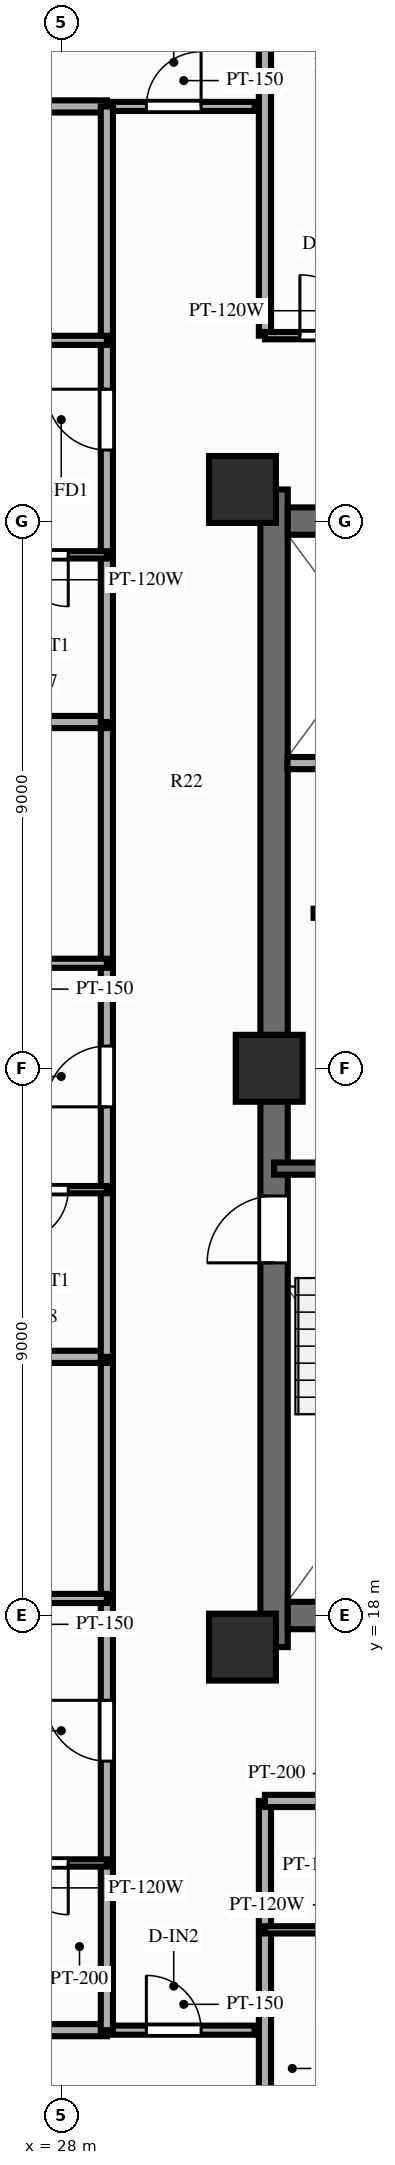
"""IFC4 building model, lengths in metres.
Left out: names, types, materials, properties, quantities, classifications, styles, units other than length and angle.
Written with IfcOpenShell. Run it as: python <this file> out.ifc"""

import sys

from ifc_helpers import new_model, si_unit, direction, frame, frame_2d, origin, origin_2d, place, context, subcontext, project, spatial, rectangle, extrude, source, transform, mapped, element, fill, save


model = new_model("IFC4")
c1 = context("Model", 3, precision=1e-05, world=origin(), true_north=direction((0.0, 1.0)))
c2 = subcontext(c1, "Body", "Model", "MODEL_VIEW")
j1 = project(units=[si_unit("LENGTHUNIT", "METRE"), si_unit("PLANEANGLEUNIT", "RADIAN")], contexts=[c1])
p1 = place(None, origin())
s1 = spatial("IfcSite", under=j1, at=p1, CompositionType="ELEMENT")
p2 = place(p1, origin())
s2 = spatial("IfcBuilding", under=s1, at=p2, CompositionType="ELEMENT")
p3 = place(p2, frame((0.0, 0.0, 176.8)))
s3 = spatial("IfcBuildingStorey", under=s2, at=p3, CompositionType="ELEMENT", Elevation=176.8)
p4 = place(p3, frame((31.5, 17.48, 0.0), z_axis=(0.0, 0.0, 1.0), x_axis=(0.0, 1.0, 0.0)))
e1 = element("IfcWall", 1, at=p4, inside=s3, PredefinedType="SHEAR", context=c2, shape_type="SweptSolid", body=[
    extrude(rectangle(XDim=19.04, YDim=0.45, at=frame_2d((9.52, 0.0))), origin(), (0.0, 0.0, 1.0), 3.0),
])
p5 = place(p4, frame((6.32, 0.0, 0.0)))
e2 = element("IfcOpeningElement", 2, at=p5, cuts=e1, PredefinedType="OPENING", context=c2, shape_type="SweptSolid", body=[
    extrude(rectangle(XDim=1.1, YDim=2.15, at=frame_2d((0.55, 1.075))), frame((0.0, 0.237, 0.0), z_axis=(0.0, -1.0, 0.0), x_axis=(1.0, 0.0, 0.0)), (0.0, 0.0, 1.0), 0.474),
])
p6 = place(p3, frame((31.725, 18.0, 0.0), z_axis=(0.0, 0.0, 1.0), x_axis=(1.0, 0.0, 0.0)))
e3 = element("IfcWall", 3, at=p6, inside=s3, PredefinedType="SHEAR", context=c2, shape_type="SweptSolid", body=[
    extrude(rectangle(XDim=12.55, YDim=0.45, at=frame_2d((6.275, 0.0))), origin(), (0.0, 0.0, 1.0), 3.0),
])
p7 = place(p3, frame((31.725, 36.0, 0.0), z_axis=(0.0, 0.0, 1.0), x_axis=(1.0, 0.0, 0.0)))
e4 = element("IfcWall", 4, at=p7, inside=s3, PredefinedType="SHEAR", context=c2, shape_type="SweptSolid", body=[
    extrude(rectangle(XDim=12.55, YDim=0.45, at=frame_2d((6.275, 0.0))), origin(), (0.0, 0.0, 1.0), 3.0),
])
p8 = place(p7, frame((5.225, 0.0, 0.0), z_axis=(0.0, 0.0, 1.0), x_axis=(-1.0, 0.0, 0.0)))
e5 = element("IfcOpeningElement", 5, at=p8, cuts=e4, PredefinedType="OPENING", context=c2, shape_type="SweptSolid", body=[
    extrude(rectangle(XDim=1.4, YDim=2.15, at=frame_2d((0.7, 1.075))), frame((0.0, 0.237, 0.0), z_axis=(0.0, -1.0, 0.0), x_axis=(1.0, 0.0, 0.0)), (0.0, 0.0, 1.0), 0.474),
])
m1 = source(origin(), c2, "Body", "SweptSolid", [
    extrude(rectangle(XDim=1.1, YDim=1.1, at=origin_2d()), origin(), (0.0, 0.0, 1.0), 3.0),
])
for number, where, z_axis, x_axis in (
    (6, (30.98, 17.48, 0.0), (0.0, 0.0, 1.0), (1.0, 0.0, 0.0)),
    (7, (30.98, 36.52, 0.0), (0.0, 0.0, 1.0), (1.0, 0.0, 0.0)),
    (8, (31.42, 27.0, 0.0), (0.0, 0.0, 1.0), (1.0, 0.0, 0.0)),
):
    element("IfcColumn", number, at=place(p3, frame(where, z_axis=z_axis, x_axis=x_axis)), inside=s3, PredefinedType="COLUMN", context=c2, shape_type="MappedRepresentation", body=[
        mapped(m1, transform((0.0, 0.0, 0.0), scale=1.0)),
    ])
p9 = place(p3, frame((32.15, 29.55, 0.0), z_axis=(0.0, 0.0, 1.0), x_axis=(1.0, 0.0, 0.0)))
e9 = element("IfcWall", 9, at=p9, inside=s3, PredefinedType="PARTITIONING", context=c2, shape_type="SweptSolid", body=[
    extrude(rectangle(XDim=2.27, YDim=0.15, at=frame_2d((1.135, 0.0))), origin(), (0.0, 0.0, 1.0), 2.79),
])
p10 = place(p3, frame((31.5, 25.35, 0.0), z_axis=(0.0, 0.0, 1.0), x_axis=(1.0, 0.0, 0.0)))
e10 = element("IfcWall", 10, at=p10, inside=s3, PredefinedType="SOLIDWALL", context=c2, shape_type="SweptSolid", body=[
    extrude(rectangle(XDim=3.93, YDim=0.2, at=frame_2d((1.965, 0.0))), origin(), (0.0, 0.0, 1.0), 2.79),
])
p11 = place(p3, frame((31.72, 32.02, 0.0), z_axis=(0.0, 0.0, 1.0), x_axis=(1.0, 0.0, 0.0)))
e11 = element("IfcWall", 11, at=p11, inside=s3, PredefinedType="PARTITIONING", context=c2, shape_type="SweptSolid", body=[
    extrude(rectangle(XDim=2.8, YDim=0.2, at=frame_2d((1.4, 0.0))), origin(), (0.0, 0.0, 1.0), 2.79),
])
p12 = place(p3, frame((28.85, 11.18, 0.0), z_axis=(0.0, 0.0, 1.0), x_axis=(1.0, 0.0, 0.0)))
e12 = element("IfcWall", 12, at=p12, inside=s3, PredefinedType="PARTITIONING", context=c2, shape_type="SweptSolid", body=[
    extrude(rectangle(XDim=2.33, YDim=0.15, at=frame_2d((1.165, 0.0))), origin(), (0.0, 0.0, 1.0), 2.79),
])
p13 = place(p12, frame((0.55, 0.0, 0.0)))
e13 = element("IfcOpeningElement", 13, at=p13, cuts=e12, PredefinedType="OPENING", context=c2, shape_type="SweptSolid", body=[
    extrude(rectangle(XDim=0.9, YDim=2.1, at=frame_2d((0.45, 1.05))), frame((0.0, 0.087, 0.0), z_axis=(0.0, -1.0, 0.0), x_axis=(1.0, 0.0, 0.0)), (0.0, 0.0, 1.0), 0.174),
])
p14 = place(p3, frame((28.85, 42.82, 0.0), z_axis=(0.0, 0.0, 1.0), x_axis=(1.0, 0.0, 0.0)))
e14 = element("IfcWall", 14, at=p14, inside=s3, PredefinedType="PARTITIONING", context=c2, shape_type="SweptSolid", body=[
    extrude(rectangle(XDim=2.33, YDim=0.15, at=frame_2d((1.165, 0.0))), origin(), (0.0, 0.0, 1.0), 2.79),
])
p15 = place(p14, frame((0.55, 0.0, 0.0)))
e15 = element("IfcOpeningElement", 15, at=p15, cuts=e14, PredefinedType="OPENING", context=c2, shape_type="SweptSolid", body=[
    extrude(rectangle(XDim=0.9, YDim=2.1, at=frame_2d((0.45, 1.05))), frame((0.0, 0.087, 0.0), z_axis=(0.0, -1.0, 0.0), x_axis=(1.0, 0.0, 0.0)), (0.0, 0.0, 1.0), 0.174),
])
p16 = place(p3, frame((31.35, 14.95, 0.0), z_axis=(0.0, 0.0, 1.0), x_axis=(0.0, -1.0, 0.0)))
e16 = element("IfcWall", 16, at=p16, inside=s3, PredefinedType="PARTITIONING", context=c2, shape_type="SweptSolid", body=[
    extrude(rectangle(XDim=8.8, YDim=0.2, at=frame_2d((4.4, 0.0))), origin(), (0.0, 0.0, 1.0), 2.39),
])
p17 = place(p3, frame((31.35, 14.95, 0.0), z_axis=(0.0, 0.0, 1.0), x_axis=(1.0, 0.0, 0.0)))
e17 = element("IfcWall", 17, at=p17, inside=s3, PredefinedType="PARTITIONING", context=c2, shape_type="SweptSolid", body=[
    extrude(rectangle(XDim=2.2, YDim=0.2, at=frame_2d((1.1, 0.0))), origin(), (0.0, 0.0, 1.0), 2.79),
])
p18 = place(p3, frame((31.35, 12.83, 0.0), z_axis=(0.0, 0.0, 1.0), x_axis=(1.0, 0.0, 0.0)))
e18 = element("IfcWall", 18, at=p18, inside=s3, PredefinedType="PARTITIONING", context=c2, shape_type="SweptSolid", body=[
    extrude(rectangle(XDim=2.2, YDim=0.12, at=frame_2d((1.1, 0.0))), origin(), (0.0, 0.0, 1.0), 2.79),
])
p19 = place(p3, frame((31.35, 39.05, 0.0), z_axis=(0.0, 0.0, 1.0), x_axis=(0.0, 1.0, 0.0)))
e19 = element("IfcWall", 19, at=p19, inside=s3, PredefinedType="PARTITIONING", context=c2, shape_type="SweptSolid", body=[
    extrude(rectangle(XDim=8.8, YDim=0.2, at=frame_2d((4.4, 0.0))), origin(), (0.0, 0.0, 1.0), 2.39),
])
p20 = place(p3, frame((31.35, 39.05, 0.0), z_axis=(0.0, 0.0, 1.0), x_axis=(1.0, 0.0, 0.0)))
e20 = element("IfcWall", 20, at=p20, inside=s3, PredefinedType="PARTITIONING", context=c2, shape_type="SweptSolid", body=[
    extrude(rectangle(XDim=2.15, YDim=0.12, at=frame_2d((1.075, 0.0))), origin(), (0.0, 0.0, 1.0), 2.79),
])
p21 = place(p20, frame((0.575, 0.0, 0.0)))
e21 = element("IfcOpeningElement", 21, at=p21, cuts=e20, PredefinedType="OPENING", context=c2, shape_type="SweptSolid", body=[
    extrude(rectangle(XDim=1.0, YDim=2.1, at=frame_2d((0.5, 1.05))), frame((0.0, 0.072, 0.0), z_axis=(0.0, -1.0, 0.0), x_axis=(1.0, 0.0, 0.0)), (0.0, 0.0, 1.0), 0.144),
])
for number, where, z_axis, x_axis in (
    (22, (28.75, 11.18, 0.0), (0.0, 0.0, 1.0), (-1.0, 0.0, 0.0)),
    (23, (28.75, 42.82, 0.0), (0.0, 0.0, 1.0), (-1.0, 0.0, 0.0)),
):
    element("IfcWall", number, at=place(p3, frame(where, z_axis=z_axis, x_axis=x_axis)), inside=s3, PredefinedType="PARTITIONING", context=c2, shape_type="SweptSolid", body=[
        extrude(rectangle(XDim=10.85, YDim=0.2, at=frame_2d((5.425, 0.0))), origin(), (0.0, 0.0, 1.0), 2.79),
    ])
p22 = place(p3, frame((28.75, 11.18, 0.0), z_axis=(0.0, 0.0, 1.0), x_axis=(0.0, 1.0, 0.0)))
e24 = element("IfcWall", 24, at=p22, inside=s3, PredefinedType="PARTITIONING", context=c2, shape_type="SweptSolid", body=[
    extrude(rectangle(XDim=2.75, YDim=0.2, at=frame_2d((1.375, 0.0))), origin(), (0.0, 0.0, 1.0), 2.79),
])
p23 = place(p3, frame((28.75, 13.93, 0.0), z_axis=(0.0, 0.0, 1.0), x_axis=(0.0, 1.0, 0.0)))
e25 = element("IfcWall", 25, at=p23, inside=s3, PredefinedType="PARTITIONING", context=c2, shape_type="SweptSolid", body=[
    extrude(rectangle(XDim=4.35, YDim=0.2, at=frame_2d((2.175, 0.0))), origin(), (0.0, 0.0, 1.0), 2.79),
])
p24 = place(p23, frame((1.675, 0.0, 0.0)))
e26 = element("IfcOpeningElement", 26, at=p24, cuts=e25, PredefinedType="OPENING", context=c2, shape_type="SweptSolid", body=[
    extrude(rectangle(XDim=1.0, YDim=2.15, at=frame_2d((0.5, 1.075))), frame((0.0, 0.112, 0.0), z_axis=(0.0, -1.0, 0.0), x_axis=(1.0, 0.0, 0.0)), (0.0, 0.0, 1.0), 0.224),
])
p25 = place(p3, frame((28.75, 18.28, 0.0), z_axis=(0.0, 0.0, 1.0), x_axis=(0.0, 1.0, 0.0)))
e27 = element("IfcWall", 27, at=p25, inside=s3, PredefinedType="PARTITIONING", context=c2, shape_type="SweptSolid", body=[
    extrude(rectangle(XDim=3.974, YDim=0.2, at=frame_2d((1.987, 0.0))), origin(), (0.0, 0.0, 1.0), 2.79),
])
p26 = place(p3, frame((28.75, 13.93, 0.0), z_axis=(0.0, 0.0, 1.0), x_axis=(-1.0, 0.0, 0.0)))
e28 = element("IfcWall", 28, at=p26, inside=s3, PredefinedType="PARTITIONING", context=c2, shape_type="SweptSolid", body=[
    extrude(rectangle(XDim=2.12, YDim=0.12, at=frame_2d((1.06, 0.0))), origin(), (0.0, 0.0, 1.0), 2.79),
])
p27 = place(p26, frame((0.635, 0.0, 0.0)))
e29 = element("IfcOpeningElement", 29, at=p27, cuts=e28, PredefinedType="OPENING", context=c2, shape_type="SweptSolid", body=[
    extrude(rectangle(XDim=0.85, YDim=2.05, at=frame_2d((0.425, 1.025))), frame((0.0, 0.072, 0.0), z_axis=(0.0, -1.0, 0.0), x_axis=(1.0, 0.0, 0.0)), (0.0, 0.0, 1.0), 0.144),
])
p28 = place(p3, frame((28.75, 18.28, 0.0), z_axis=(0.0, 0.0, 1.0), x_axis=(-1.0, 0.0, 0.0)))
e30 = element("IfcWall", 30, at=p28, inside=s3, PredefinedType="PARTITIONING", context=c2, shape_type="SweptSolid", body=[
    extrude(rectangle(XDim=3.16, YDim=0.15, at=frame_2d((1.58, 0.0))), origin(), (0.0, 0.0, 1.0), 2.79),
])
p29 = place(p28, frame((1.13, 0.0, 0.0)))
e31 = element("IfcOpeningElement", 31, at=p29, cuts=e30, PredefinedType="OPENING", context=c2, shape_type="SweptSolid", body=[
    extrude(rectangle(XDim=0.9, YDim=2.1, at=frame_2d((0.45, 1.05))), frame((0.0, 0.087, 0.0), z_axis=(0.0, -1.0, 0.0), x_axis=(1.0, 0.0, 0.0)), (0.0, 0.0, 1.0), 0.174),
])
p30 = place(p3, frame((28.75, 22.254, 0.0), z_axis=(0.0, 0.0, 1.0), x_axis=(-1.0, 0.0, 0.0)))
e32 = element("IfcWall", 32, at=p30, inside=s3, PredefinedType="PARTITIONING", context=c2, shape_type="SweptSolid", body=[
    extrude(rectangle(XDim=10.85, YDim=0.2, at=frame_2d((5.425, 0.0))), origin(), (0.0, 0.0, 1.0), 2.39),
])
p31 = place(p3, frame((28.75, 22.254, 0.0), z_axis=(0.0, 0.0, 1.0), x_axis=(0.0, 1.0, 0.0)))
e33 = element("IfcWall", 33, at=p31, inside=s3, PredefinedType="PARTITIONING", context=c2, shape_type="SweptSolid", body=[
    extrude(rectangle(XDim=2.75, YDim=0.2, at=frame_2d((1.375, 0.0))), origin(), (0.0, 0.0, 1.0), 2.79),
])
p32 = place(p3, frame((28.75, 25.004, 0.0), z_axis=(0.0, 0.0, 1.0), x_axis=(0.0, 1.0, 0.0)))
e34 = element("IfcWall", 34, at=p32, inside=s3, PredefinedType="PARTITIONING", context=c2, shape_type="SweptSolid", body=[
    extrude(rectangle(XDim=3.724, YDim=0.2, at=frame_2d((1.862, 0.0))), origin(), (0.0, 0.0, 1.0), 2.79),
])
p33 = place(p32, frame((1.362, 0.0, 0.0)))
e35 = element("IfcOpeningElement", 35, at=p33, cuts=e34, PredefinedType="OPENING", context=c2, shape_type="SweptSolid", body=[
    extrude(rectangle(XDim=1.0, YDim=2.15, at=frame_2d((0.5, 1.075))), frame((0.0, 0.112, 0.0), z_axis=(0.0, -1.0, 0.0), x_axis=(1.0, 0.0, 0.0)), (0.0, 0.0, 1.0), 0.224),
])
p34 = place(p3, frame((28.75, 28.728, 0.0), z_axis=(0.0, 0.0, 1.0), x_axis=(0.0, 1.0, 0.0)))
e36 = element("IfcWall", 36, at=p34, inside=s3, PredefinedType="PARTITIONING", context=c2, shape_type="SweptSolid", body=[
    extrude(rectangle(XDim=3.968, YDim=0.2, at=frame_2d((1.984, 0.0))), origin(), (0.0, 0.0, 1.0), 2.79),
])
p35 = place(p3, frame((28.75, 25.004, 0.0), z_axis=(0.0, 0.0, 1.0), x_axis=(-1.0, 0.0, 0.0)))
e37 = element("IfcWall", 37, at=p35, inside=s3, PredefinedType="PARTITIONING", context=c2, shape_type="SweptSolid", body=[
    extrude(rectangle(XDim=2.12, YDim=0.12, at=frame_2d((1.06, 0.0))), origin(), (0.0, 0.0, 1.0), 2.79),
])
p36 = place(p35, frame((0.635, 0.0, 0.0)))
e38 = element("IfcOpeningElement", 38, at=p36, cuts=e37, PredefinedType="OPENING", context=c2, shape_type="SweptSolid", body=[
    extrude(rectangle(XDim=0.85, YDim=2.05, at=frame_2d((0.425, 1.025))), frame((0.0, 0.072, 0.0), z_axis=(0.0, -1.0, 0.0), x_axis=(1.0, 0.0, 0.0)), (0.0, 0.0, 1.0), 0.144),
])
p37 = place(p3, frame((28.75, 28.728, 0.0), z_axis=(0.0, 0.0, 1.0), x_axis=(-1.0, 0.0, 0.0)))
e39 = element("IfcWall", 39, at=p37, inside=s3, PredefinedType="PARTITIONING", context=c2, shape_type="SweptSolid", body=[
    extrude(rectangle(XDim=3.16, YDim=0.15, at=frame_2d((1.58, 0.0))), origin(), (0.0, 0.0, 1.0), 2.79),
])
p38 = place(p37, frame((1.13, 0.0, 0.0)))
e40 = element("IfcOpeningElement", 40, at=p38, cuts=e39, PredefinedType="OPENING", context=c2, shape_type="SweptSolid", body=[
    extrude(rectangle(XDim=0.9, YDim=2.1, at=frame_2d((0.45, 1.05))), frame((0.0, 0.087, 0.0), z_axis=(0.0, -1.0, 0.0), x_axis=(1.0, 0.0, 0.0)), (0.0, 0.0, 1.0), 0.174),
])
p39 = place(p3, frame((28.75, 32.695, 0.0), z_axis=(0.0, 0.0, 1.0), x_axis=(-1.0, 0.0, 0.0)))
e41 = element("IfcWall", 41, at=p39, inside=s3, PredefinedType="PARTITIONING", context=c2, shape_type="SweptSolid", body=[
    extrude(rectangle(XDim=10.85, YDim=0.2, at=frame_2d((5.425, 0.0))), origin(), (0.0, 0.0, 1.0), 2.79),
])
p40 = place(p3, frame((28.75, 32.695, 0.0), z_axis=(0.0, 0.0, 1.0), x_axis=(0.0, 1.0, 0.0)))
e42 = element("IfcWall", 42, at=p40, inside=s3, PredefinedType="PARTITIONING", context=c2, shape_type="SweptSolid", body=[
    extrude(rectangle(XDim=2.75, YDim=0.2, at=frame_2d((1.375, 0.0))), origin(), (0.0, 0.0, 1.0), 2.79),
])
p41 = place(p3, frame((28.75, 35.445, 0.0), z_axis=(0.0, 0.0, 1.0), x_axis=(0.0, 1.0, 0.0)))
e43 = element("IfcWall", 43, at=p41, inside=s3, PredefinedType="PARTITIONING", context=c2, shape_type="SweptSolid", body=[
    extrude(rectangle(XDim=3.527, YDim=0.2, at=frame_2d((1.764, 0.0))), origin(), (0.0, 0.0, 1.0), 2.79),
])
p42 = place(p41, frame((1.724, 0.0, 0.0)))
e44 = element("IfcOpeningElement", 44, at=p42, cuts=e43, PredefinedType="OPENING", context=c2, shape_type="SweptSolid", body=[
    extrude(rectangle(XDim=1.0, YDim=2.15, at=frame_2d((0.5, 1.075))), frame((0.0, 0.112, 0.0), z_axis=(0.0, -1.0, 0.0), x_axis=(1.0, 0.0, 0.0)), (0.0, 0.0, 1.0), 0.224),
])
p43 = place(p3, frame((28.75, 38.973, 0.0), z_axis=(0.0, 0.0, 1.0), x_axis=(0.0, 1.0, 0.0)))
e45 = element("IfcWall", 45, at=p43, inside=s3, PredefinedType="PARTITIONING", context=c2, shape_type="SweptSolid", body=[
    extrude(rectangle(XDim=3.847, YDim=0.2, at=frame_2d((1.924, 0.0))), origin(), (0.0, 0.0, 1.0), 2.79),
])
p44 = place(p3, frame((28.75, 35.445, 0.0), z_axis=(0.0, 0.0, 1.0), x_axis=(-1.0, 0.0, 0.0)))
e46 = element("IfcWall", 46, at=p44, inside=s3, PredefinedType="PARTITIONING", context=c2, shape_type="SweptSolid", body=[
    extrude(rectangle(XDim=2.12, YDim=0.12, at=frame_2d((1.06, 0.0))), origin(), (0.0, 0.0, 1.0), 2.79),
])
p45 = place(p44, frame((0.635, 0.0, 0.0)))
e47 = element("IfcOpeningElement", 47, at=p45, cuts=e46, PredefinedType="OPENING", context=c2, shape_type="SweptSolid", body=[
    extrude(rectangle(XDim=0.85, YDim=2.05, at=frame_2d((0.425, 1.025))), frame((0.0, 0.072, 0.0), z_axis=(0.0, -1.0, 0.0), x_axis=(1.0, 0.0, 0.0)), (0.0, 0.0, 1.0), 0.144),
])
p46 = place(p3, frame((28.75, 38.973, 0.0), z_axis=(0.0, 0.0, 1.0), x_axis=(-1.0, 0.0, 0.0)))
e48 = element("IfcWall", 48, at=p46, inside=s3, PredefinedType="PARTITIONING", context=c2, shape_type="SweptSolid", body=[
    extrude(rectangle(XDim=3.16, YDim=0.15, at=frame_2d((1.58, 0.0))), origin(), (0.0, 0.0, 1.0), 2.79),
])
p47 = place(p46, frame((1.13, 0.0, 0.0)))
e49 = element("IfcOpeningElement", 49, at=p47, cuts=e48, PredefinedType="OPENING", context=c2, shape_type="SweptSolid", body=[
    extrude(rectangle(XDim=0.9, YDim=2.1, at=frame_2d((0.45, 1.05))), frame((0.0, 0.087, 0.0), z_axis=(0.0, -1.0, 0.0), x_axis=(1.0, 0.0, 0.0)), (0.0, 0.0, 1.0), 0.174),
])
m2 = source(origin(), c2, "Body", "SweptSolid", [
    extrude(rectangle(XDim=1.1, YDim=2.15, at=frame_2d((0.55, 1.075))), frame((0.0, 0.025, 0.0), z_axis=(0.0, -1.0, 0.0), x_axis=(1.0, 0.0, 0.0)), (0.0, 0.0, 1.0), 0.05),
])
p48 = place(p5, origin())
e50 = element("IfcDoor", 50, at=p48, inside=s3, OperationType="SINGLE_SWING_LEFT", PredefinedType="DOOR", context=c2, shape_type="MappedRepresentation", body=[
    mapped(m2, transform((0.0, 0.0, 0.0), scale=1.0)),
])
fill(e2, e50)
m3 = source(origin(), c2, "Body", "SweptSolid", [
    extrude(rectangle(XDim=0.9, YDim=2.1, at=frame_2d((0.45, 1.05))), frame((0.0, 0.025, 0.0), z_axis=(0.0, -1.0, 0.0), x_axis=(1.0, 0.0, 0.0)), (0.0, 0.0, 1.0), 0.05),
])
p49 = place(p13, origin())
e51 = element("IfcDoor", 51, at=p49, inside=s3, OperationType="SINGLE_SWING_LEFT", PredefinedType="DOOR", context=c2, shape_type="MappedRepresentation", body=[
    mapped(m3, transform((0.0, 0.0, 0.0), scale=1.0)),
])
fill(e13, e51)
p50 = place(p15, origin())
e52 = element("IfcDoor", 52, at=p50, inside=s3, OperationType="SINGLE_SWING_RIGHT", PredefinedType="DOOR", context=c2, shape_type="MappedRepresentation", body=[
    mapped(m3, transform((0.0, 0.0, 0.0), scale=1.0)),
])
fill(e15, e52)
m4 = source(origin(), c2, "Body", "SweptSolid", [
    extrude(rectangle(XDim=1.0, YDim=2.1, at=frame_2d((0.5, 1.05))), frame((0.0, 0.025, 0.0), z_axis=(0.0, -1.0, 0.0), x_axis=(1.0, 0.0, 0.0)), (0.0, 0.0, 1.0), 0.05),
])
p51 = place(p21, origin())
e53 = element("IfcDoor", 53, at=p51, inside=s3, OperationType="SINGLE_SWING_LEFT", PredefinedType="DOOR", context=c2, shape_type="MappedRepresentation", body=[
    mapped(m4, transform((0.0, 0.0, 0.0), scale=1.0)),
])
fill(e21, e53)
m5 = source(origin(), c2, "Body", "SweptSolid", [
    extrude(rectangle(XDim=1.0, YDim=2.15, at=frame_2d((0.5, 1.075))), frame((0.0, 0.025, 0.0), z_axis=(0.0, -1.0, 0.0), x_axis=(1.0, 0.0, 0.0)), (0.0, 0.0, 1.0), 0.05),
])
p52 = place(p24, origin())
e54 = element("IfcDoor", 54, at=p52, inside=s3, OperationType="SINGLE_SWING_RIGHT", PredefinedType="DOOR", context=c2, shape_type="MappedRepresentation", body=[
    mapped(m5, transform((0.0, 0.0, 0.0), scale=1.0)),
])
fill(e26, e54)
m6 = source(origin(), c2, "Body", "SweptSolid", [
    extrude(rectangle(XDim=0.85, YDim=2.05, at=frame_2d((0.425, 1.025))), frame((0.0, 0.025, 0.0), z_axis=(0.0, -1.0, 0.0), x_axis=(1.0, 0.0, 0.0)), (0.0, 0.0, 1.0), 0.05),
])
p53 = place(p27, origin())
e55 = element("IfcDoor", 55, at=p53, inside=s3, OperationType="SINGLE_SWING_LEFT", PredefinedType="DOOR", context=c2, shape_type="MappedRepresentation", body=[
    mapped(m6, transform((0.0, 0.0, 0.0), scale=1.0)),
])
fill(e29, e55)
p54 = place(p33, origin())
e56 = element("IfcDoor", 56, at=p54, inside=s3, OperationType="SINGLE_SWING_LEFT", PredefinedType="DOOR", context=c2, shape_type="MappedRepresentation", body=[
    mapped(m5, transform((0.0, 0.0, 0.0), scale=1.0)),
])
fill(e35, e56)
p55 = place(p36, origin())
e57 = element("IfcDoor", 57, at=p55, inside=s3, OperationType="SINGLE_SWING_RIGHT", PredefinedType="DOOR", context=c2, shape_type="MappedRepresentation", body=[
    mapped(m6, transform((0.0, 0.0, 0.0), scale=1.0)),
])
fill(e38, e57)
p56 = place(p42, origin())
e58 = element("IfcDoor", 58, at=p56, inside=s3, OperationType="SINGLE_SWING_RIGHT", PredefinedType="DOOR", context=c2, shape_type="MappedRepresentation", body=[
    mapped(m5, transform((0.0, 0.0, 0.0), scale=1.0)),
])
fill(e44, e58)
p57 = place(p45, origin())
e59 = element("IfcDoor", 59, at=p57, inside=s3, OperationType="SINGLE_SWING_LEFT", PredefinedType="DOOR", context=c2, shape_type="MappedRepresentation", body=[
    mapped(m6, transform((0.0, 0.0, 0.0), scale=1.0)),
])
fill(e47, e59)
save(model, sys.argv[1])
